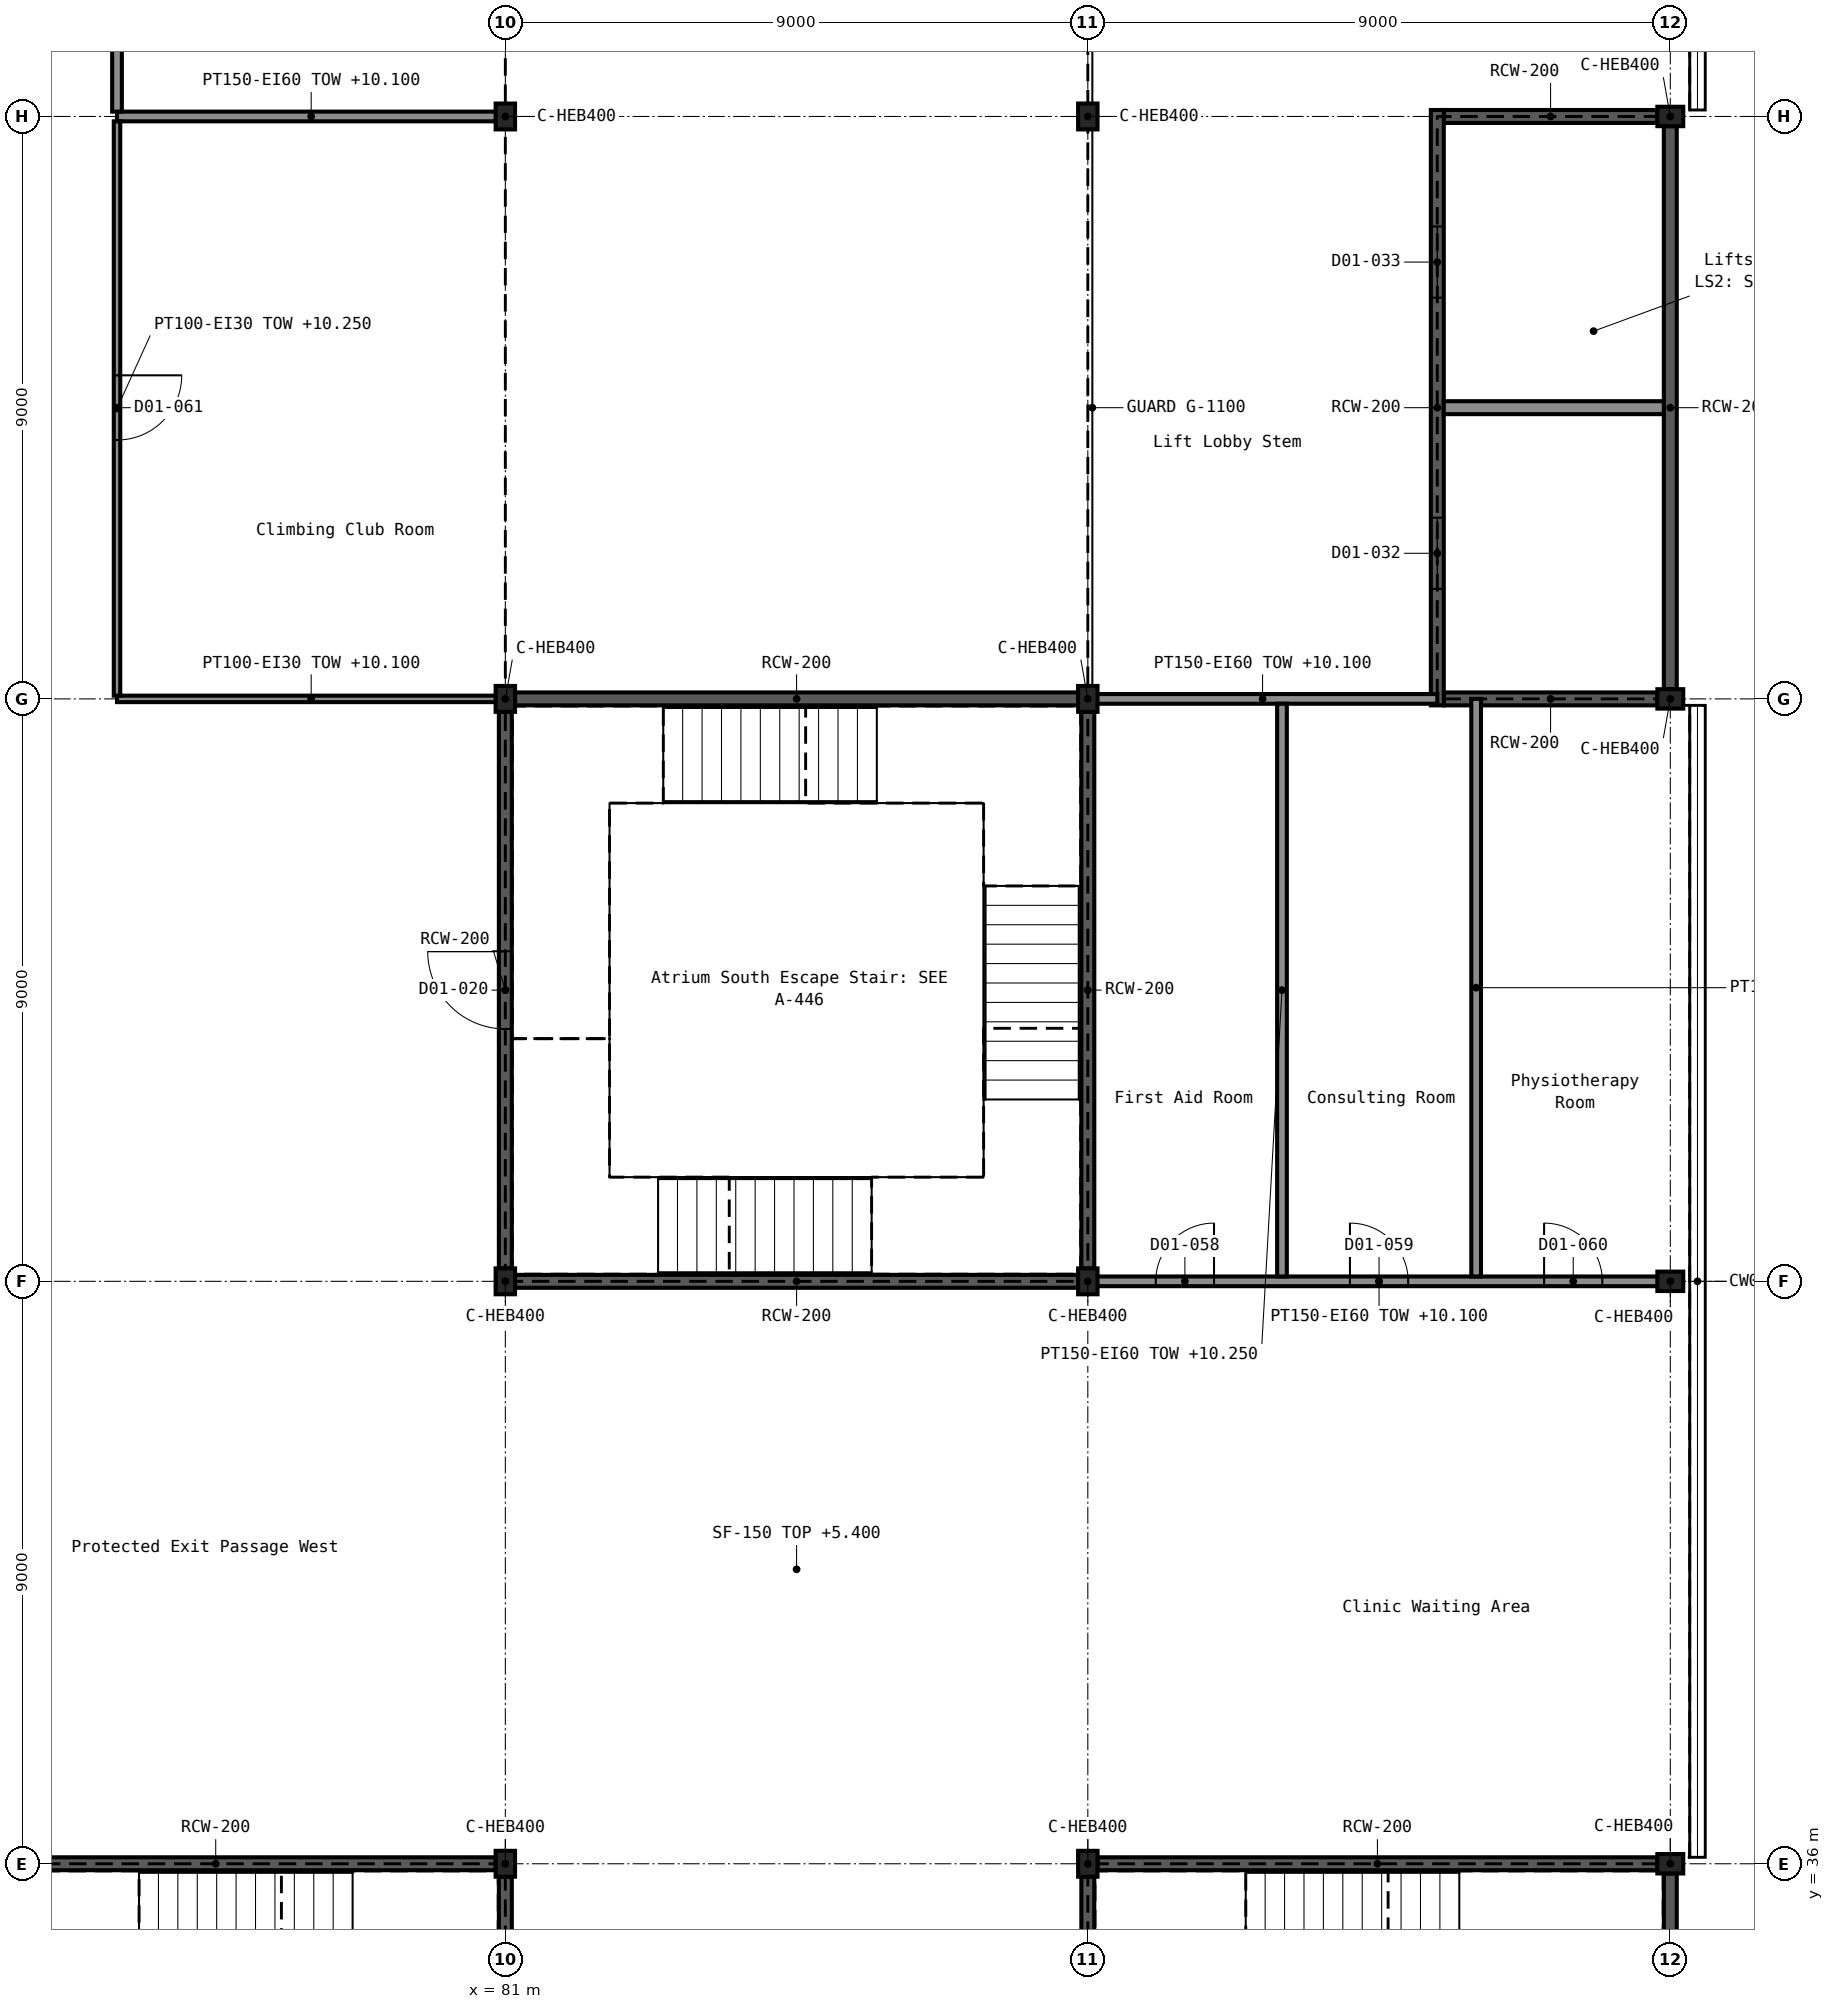
"""IFC4 building model, lengths in metres.
Left out: names, types, materials, properties, quantities, classifications, styles, units other than length and angle.
Written with IfcOpenShell. Run it as: python <this file> out.ifc"""

import sys

from ifc_helpers import new_model, si_unit, direction, frame, frame_2d, origin, origin_2d, place, context, subcontext, project, spatial, rectangle, i_section, extrude, element, fill, save


model = new_model("IFC4")
c1 = context("Model", 3, precision=1e-05, world=origin(), true_north=direction((0.0, 1.0)))
c2 = subcontext(c1, "Body", "Model", "MODEL_VIEW")
j1 = project(units=[si_unit("LENGTHUNIT", "METRE"), si_unit("PLANEANGLEUNIT", "RADIAN")], contexts=[c1])
p1 = place(None, origin())
s1 = spatial("IfcSite", under=j1, at=p1, CompositionType="ELEMENT")
p2 = place(p1, origin())
s2 = spatial("IfcBuilding", under=s1, at=p2, CompositionType="ELEMENT")
p3 = place(p2, frame((0.0, 0.0, 5.4)))
s3 = spatial("IfcBuildingStorey", under=s2, at=p3, CompositionType="ELEMENT", Elevation=5.4)
for number, where, z_axis, x_axis in (
    (1, (81.0, 36.0, 0.0), (0.0, 0.0, 1.0), (1.0, 0.0, 0.0)),
    (2, (90.0, 36.0, 0.0), (0.0, 0.0, 1.0), (1.0, 0.0, 0.0)),
    (3, (99.0, 36.0, 0.0), (0.0, 0.0, 1.0), (0.0, 1.0, 0.0)),
    (4, (81.0, 45.0, 0.0), (0.0, 0.0, 1.0), (1.0, 0.0, 0.0)),
    (5, (90.0, 45.0, 0.0), (0.0, 0.0, 1.0), (1.0, 0.0, 0.0)),
    (6, (99.0, 45.0, 0.0), (0.0, 0.0, 1.0), (0.0, 1.0, 0.0)),
    (7, (81.0, 54.0, 0.0), (0.0, 0.0, 1.0), (1.0, 0.0, 0.0)),
    (8, (90.0, 54.0, 0.0), (0.0, 0.0, 1.0), (1.0, 0.0, 0.0)),
    (9, (99.0, 54.0, 0.0), (0.0, 0.0, 1.0), (0.0, 1.0, 0.0)),
    (10, (81.0, 63.0, 0.0), (0.0, 0.0, 1.0), (1.0, 0.0, 0.0)),
    (11, (90.0, 63.0, 0.0), (0.0, 0.0, 1.0), (1.0, 0.0, 0.0)),
    (12, (99.0, 63.0, 0.0), (0.0, 0.0, 1.0), (0.0, 1.0, 0.0)),
):
    element("IfcColumn", number, at=place(p3, frame(where, z_axis=z_axis, x_axis=x_axis)), inside=s3, PredefinedType="COLUMN", context=c2, shape_type="SweptSolid", body=[
        extrude(i_section(OverallWidth=0.3, OverallDepth=0.4, WebThickness=0.013, FlangeThickness=0.024, FilletRadius=0.027, at=origin_2d()), origin(), (0.0, 0.0, 1.0), 5.4),
    ])
p4 = place(p3, frame((72.2, 36.0, 0.0), z_axis=(0.0, 0.0, 1.0), x_axis=(1.0, 0.0, 0.0)))
e13 = element("IfcWall", 13, at=p4, inside=s3, PredefinedType="SHEAR", context=c2, shape_type="SweptSolid", body=[
    extrude(rectangle(XDim=8.65, YDim=0.2, at=frame_2d((4.325, 0.0))), origin(), (0.0, 0.0, 1.0), 5.4),
])
p5 = place(p3, frame((81.0, 27.2, 0.0), z_axis=(0.0, 0.0, 1.0), x_axis=(0.0, 1.0, 0.0)))
e14 = element("IfcWall", 14, at=p5, inside=s3, PredefinedType="SHEAR", context=c2, shape_type="SweptSolid", body=[
    extrude(rectangle(XDim=8.6, YDim=0.2, at=frame_2d((4.3, 0.0))), origin(), (0.0, 0.0, 1.0), 5.4),
])
p6 = place(p5, frame((3.7, 0.0, 0.0)))
e15 = element("IfcOpeningElement", 15, at=p6, cuts=e14, PredefinedType="OPENING", context=c2, shape_type="SweptSolid", body=[
    extrude(rectangle(XDim=1.2, YDim=2.1, at=frame_2d((0.6, 1.05))), frame((0.0, 0.111, 0.0), z_axis=(0.0, -1.0, 0.0), x_axis=(1.0, 0.0, 0.0)), (0.0, 0.0, 1.0), 0.222),
])
p7 = place(p3, frame((90.15, 36.0, 0.0), z_axis=(0.0, 0.0, 1.0), x_axis=(1.0, 0.0, 0.0)))
e16 = element("IfcWall", 16, at=p7, inside=s3, PredefinedType="SHEAR", context=c2, shape_type="SweptSolid", body=[
    extrude(rectangle(XDim=8.65, YDim=0.2, at=frame_2d((4.325, 0.0))), origin(), (0.0, 0.0, 1.0), 5.4),
])
p8 = place(p3, frame((90.0, 27.2, 0.0), z_axis=(0.0, 0.0, 1.0), x_axis=(0.0, 1.0, 0.0)))
e17 = element("IfcWall", 17, at=p8, inside=s3, PredefinedType="SHEAR", context=c2, shape_type="SweptSolid", body=[
    extrude(rectangle(XDim=8.6, YDim=0.2, at=frame_2d((4.3, 0.0))), origin(), (0.0, 0.0, 1.0), 5.4),
])
p9 = place(p8, frame((3.7, 0.0, 0.0)))
e18 = element("IfcOpeningElement", 18, at=p9, cuts=e17, PredefinedType="OPENING", context=c2, shape_type="SweptSolid", body=[
    extrude(rectangle(XDim=1.2, YDim=2.1, at=frame_2d((0.6, 1.05))), frame((0.0, 0.111, 0.0), z_axis=(0.0, -1.0, 0.0), x_axis=(1.0, 0.0, 0.0)), (0.0, 0.0, 1.0), 0.222),
])
p10 = place(p3, frame((99.0, 27.15, -0.15), z_axis=(0.0, 0.0, 1.0), x_axis=(0.0, 1.0, 0.0)))
e19 = element("IfcWall", 19, at=p10, inside=s3, PredefinedType="SHEAR", context=c2, shape_type="SweptSolid", body=[
    extrude(rectangle(XDim=8.7, YDim=0.2, at=frame_2d((4.35, 0.0))), origin(), (0.0, 0.0, 1.0), 5.55),
])
for number, where, z_axis, x_axis in (
    (20, (81.15, 45.0, 0.0), (0.0, 0.0, 1.0), (1.0, 0.0, 0.0)),
    (21, (81.15, 54.0, 0.0), (0.0, 0.0, 1.0), (1.0, 0.0, 0.0)),
):
    element("IfcWall", number, at=place(p3, frame(where, z_axis=z_axis, x_axis=x_axis)), inside=s3, PredefinedType="SHEAR", context=c2, shape_type="SweptSolid", body=[
        extrude(rectangle(XDim=8.7, YDim=0.2, at=frame_2d((4.35, 0.0))), origin(), (0.0, 0.0, 1.0), 5.4),
    ])
p11 = place(p3, frame((81.0, 45.2, 0.0), z_axis=(0.0, 0.0, 1.0), x_axis=(0.0, 1.0, 0.0)))
e22 = element("IfcWall", 22, at=p11, inside=s3, PredefinedType="SHEAR", context=c2, shape_type="SweptSolid", body=[
    extrude(rectangle(XDim=8.6, YDim=0.2, at=frame_2d((4.3, 0.0))), origin(), (0.0, 0.0, 1.0), 5.4),
])
p12 = place(p11, frame((3.7, 0.0, 0.0)))
e23 = element("IfcOpeningElement", 23, at=p12, cuts=e22, PredefinedType="OPENING", context=c2, shape_type="SweptSolid", body=[
    extrude(rectangle(XDim=1.2, YDim=2.1, at=frame_2d((0.6, 1.05))), frame((0.0, 0.111, 0.0), z_axis=(0.0, -1.0, 0.0), x_axis=(1.0, 0.0, 0.0)), (0.0, 0.0, 1.0), 0.222),
])
p13 = place(p3, frame((90.0, 45.2, 0.0), z_axis=(0.0, 0.0, 1.0), x_axis=(0.0, 1.0, 0.0)))
e24 = element("IfcWall", 24, at=p13, inside=s3, PredefinedType="SHEAR", context=c2, shape_type="SweptSolid", body=[
    extrude(rectangle(XDim=8.6, YDim=0.2, at=frame_2d((4.3, 0.0))), origin(), (0.0, 0.0, 1.0), 5.4),
])
for number, where, z_axis, x_axis in (
    (25, (95.5, 54.0, 0.0), (0.0, 0.0, 1.0), (1.0, 0.0, 0.0)),
    (26, (95.5, 63.0, 0.0), (0.0, 0.0, 1.0), (1.0, 0.0, 0.0)),
):
    element("IfcWall", number, at=place(p3, frame(where, z_axis=z_axis, x_axis=x_axis)), inside=s3, PredefinedType="SHEAR", context=c2, shape_type="SweptSolid", body=[
        extrude(rectangle(XDim=3.3, YDim=0.2, at=frame_2d((1.65, 0.0))), origin(), (0.0, 0.0, 1.0), 5.4),
    ])
p14 = place(p3, frame((95.4, 53.9, 0.0), z_axis=(0.0, 0.0, 1.0), x_axis=(0.0, 1.0, 0.0)))
e27 = element("IfcWall", 27, at=p14, inside=s3, PredefinedType="SHEAR", context=c2, shape_type="SweptSolid", body=[
    extrude(rectangle(XDim=9.2, YDim=0.2, at=frame_2d((4.6, 0.0))), origin(), (0.0, 0.0, 1.0), 5.4),
])
p15 = place(p14, frame((1.8, 0.0, 0.0)))
e28 = element("IfcOpeningElement", 28, at=p15, cuts=e27, PredefinedType="OPENING", context=c2, shape_type="SweptSolid", body=[
    extrude(rectangle(XDim=1.1, YDim=2.1, at=frame_2d((0.55, 1.05))), frame((0.0, 0.111, 0.0), z_axis=(0.0, -1.0, 0.0), x_axis=(1.0, 0.0, 0.0)), (0.0, 0.0, 1.0), 0.222),
])
p16 = place(p14, frame((6.3, 0.0, 0.0)))
e29 = element("IfcOpeningElement", 29, at=p16, cuts=e27, PredefinedType="OPENING", context=c2, shape_type="SweptSolid", body=[
    extrude(rectangle(XDim=1.1, YDim=2.1, at=frame_2d((0.55, 1.05))), frame((0.0, 0.111, 0.0), z_axis=(0.0, -1.0, 0.0), x_axis=(1.0, 0.0, 0.0)), (0.0, 0.0, 1.0), 0.222),
])
p17 = place(p3, frame((99.0, 54.15, 0.0), z_axis=(0.0, 0.0, 1.0), x_axis=(0.0, 1.0, 0.0)))
e30 = element("IfcWall", 30, at=p17, inside=s3, PredefinedType="SHEAR", context=c2, shape_type="SweptSolid", body=[
    extrude(rectangle(XDim=8.7, YDim=0.2, at=frame_2d((4.35, 0.0))), origin(), (0.0, 0.0, 1.0), 5.4),
])
p18 = place(p3, frame((95.5, 58.5, 0.0), z_axis=(0.0, 0.0, 1.0), x_axis=(1.0, 0.0, 0.0)))
e31 = element("IfcWall", 31, at=p18, inside=s3, PredefinedType="SOLIDWALL", context=c2, shape_type="SweptSolid", body=[
    extrude(rectangle(XDim=3.4, YDim=0.2, at=frame_2d((1.7, 0.0))), origin(), (0.0, 0.0, 1.0), 5.4),
])
p19 = place(p3, frame((90.0, 45.0, 0.0), z_axis=(0.0, 0.0, 1.0), x_axis=(1.0, 0.0, 0.0)))
e32 = element("IfcWall", 32, at=p19, inside=s3, PredefinedType="PARTITIONING", context=c2, shape_type="SweptSolid", body=[
    extrude(rectangle(XDim=9.0, YDim=0.15, at=frame_2d((4.5, 0.0))), origin(), (0.0, 0.0, 1.0), 4.7),
])
p20 = place(p19, frame((1.05, 0.0, 0.0)))
e33 = element("IfcOpeningElement", 33, at=p20, cuts=e32, PredefinedType="OPENING", context=c2, shape_type="SweptSolid", body=[
    extrude(rectangle(XDim=0.9, YDim=2.1, at=frame_2d((0.45, 1.05))), frame((0.0, 0.086, 0.0), z_axis=(0.0, -1.0, 0.0), x_axis=(1.0, 0.0, 0.0)), (0.0, 0.0, 1.0), 0.172),
])
p21 = place(p19, frame((4.05, 0.0, 0.0)))
e34 = element("IfcOpeningElement", 34, at=p21, cuts=e32, PredefinedType="OPENING", context=c2, shape_type="SweptSolid", body=[
    extrude(rectangle(XDim=0.9, YDim=2.1, at=frame_2d((0.45, 1.05))), frame((0.0, 0.086, 0.0), z_axis=(0.0, -1.0, 0.0), x_axis=(1.0, 0.0, 0.0)), (0.0, 0.0, 1.0), 0.172),
])
p22 = place(p19, frame((7.05, 0.0, 0.0)))
e35 = element("IfcOpeningElement", 35, at=p22, cuts=e32, PredefinedType="OPENING", context=c2, shape_type="SweptSolid", body=[
    extrude(rectangle(XDim=0.9, YDim=2.1, at=frame_2d((0.45, 1.05))), frame((0.0, 0.086, 0.0), z_axis=(0.0, -1.0, 0.0), x_axis=(1.0, 0.0, 0.0)), (0.0, 0.0, 1.0), 0.172),
])
p23 = place(p3, frame((90.0, 54.0, 0.0), z_axis=(0.0, 0.0, 1.0), x_axis=(1.0, 0.0, 0.0)))
e36 = element("IfcWall", 36, at=p23, inside=s3, PredefinedType="PARTITIONING", context=c2, shape_type="SweptSolid", body=[
    extrude(rectangle(XDim=5.4, YDim=0.15, at=frame_2d((2.7, 0.0))), origin(), (0.0, 0.0, 1.0), 4.7),
])
p24 = place(p3, frame((75.0, 63.0, 0.0), z_axis=(0.0, 0.0, 1.0), x_axis=(1.0, 0.0, 0.0)))
e37 = element("IfcWall", 37, at=p24, inside=s3, PredefinedType="PARTITIONING", context=c2, shape_type="SweptSolid", body=[
    extrude(rectangle(XDim=6.0, YDim=0.15, at=frame_2d((3.0, 0.0))), origin(), (0.0, 0.0, 1.0), 4.7),
])
p25 = place(p3, frame((75.0, 63.075, 0.0), z_axis=(0.0, 0.0, 1.0), x_axis=(0.0, 1.0, 0.0)))
e38 = element("IfcWall", 38, at=p25, inside=s3, PredefinedType="PARTITIONING", context=c2, shape_type="SweptSolid", body=[
    extrude(rectangle(XDim=8.85, YDim=0.15, at=frame_2d((4.425, 0.0))), origin(), (0.0, 0.0, 1.0), 4.85),
])
p26 = place(p25, frame((3.975, 0.0, 0.0)))
e39 = element("IfcOpeningElement", 39, at=p26, cuts=e38, PredefinedType="OPENING", context=c2, shape_type="SweptSolid", body=[
    extrude(rectangle(XDim=0.9, YDim=2.4, at=frame_2d((0.45, 1.2))), frame((0.0, 0.086, 0.0), z_axis=(0.0, -1.0, 0.0), x_axis=(1.0, 0.0, 0.0)), (0.0, 0.0, 1.0), 0.172),
])
p27 = place(p3, frame((93.0, 45.075, 0.0), z_axis=(0.0, 0.0, 1.0), x_axis=(0.0, 1.0, 0.0)))
e40 = element("IfcWall", 40, at=p27, inside=s3, PredefinedType="PARTITIONING", context=c2, shape_type="SweptSolid", body=[
    extrude(rectangle(XDim=8.85, YDim=0.15, at=frame_2d((4.425, 0.0))), origin(), (0.0, 0.0, 1.0), 4.85),
])
p28 = place(p3, frame((96.0, 45.075, 0.0), z_axis=(0.0, 0.0, 1.0), x_axis=(0.0, 1.0, 0.0)))
e41 = element("IfcWall", 41, at=p28, inside=s3, PredefinedType="PARTITIONING", context=c2, shape_type="SweptSolid", body=[
    extrude(rectangle(XDim=8.925, YDim=0.15, at=frame_2d((4.462, 0.0))), origin(), (0.0, 0.0, 1.0), 4.85),
])
p29 = place(p3, frame((75.0, 54.0, 0.0), z_axis=(0.0, 0.0, 1.0), x_axis=(1.0, 0.0, 0.0)))
e42 = element("IfcWall", 42, at=p29, inside=s3, PredefinedType="PARTITIONING", context=c2, shape_type="SweptSolid", body=[
    extrude(rectangle(XDim=6.0, YDim=0.1, at=frame_2d((3.0, 0.0))), origin(), (0.0, 0.0, 1.0), 4.7),
])
p30 = place(p3, frame((75.0, 54.05, 0.0), z_axis=(0.0, 0.0, 1.0), x_axis=(0.0, 1.0, 0.0)))
e43 = element("IfcWall", 43, at=p30, inside=s3, PredefinedType="PARTITIONING", context=c2, shape_type="SweptSolid", body=[
    extrude(rectangle(XDim=8.875, YDim=0.1, at=frame_2d((4.438, 0.0))), origin(), (0.0, 0.0, 1.0), 4.85),
])
p31 = place(p30, frame((3.95, 0.0, 0.0)))
e44 = element("IfcOpeningElement", 44, at=p31, cuts=e43, PredefinedType="OPENING", context=c2, shape_type="SweptSolid", body=[
    extrude(rectangle(XDim=1.0, YDim=2.1, at=frame_2d((0.5, 1.05))), frame((0.0, 0.061, 0.0), z_axis=(0.0, -1.0, 0.0), x_axis=(1.0, 0.0, 0.0)), (0.0, 0.0, 1.0), 0.122),
])
p32 = place(p2, origin())
s4 = spatial("IfcBuildingStorey", under=s2, at=p32, CompositionType="ELEMENT", Elevation=0.0)
p33 = place(p32, frame((81.15, 54.1, 0.0), z_axis=(0.0, 0.0, 1.0), x_axis=(0.0, 1.0, 0.0)))
e45 = element("IfcWall", 45, at=p33, inside=s4, PredefinedType="SOLIDWALL", context=c2, shape_type="SweptSolid", body=[
    extrude(rectangle(XDim=17.8, YDim=0.3, at=frame_2d((8.9, 0.0))), origin(), (0.0, 0.0, 1.0), 16.0),
])
p34 = place(p12, origin())
e46 = element("IfcDoor", 46, at=p34, inside=s3, OperationType="SINGLE_SWING_RIGHT", PredefinedType="DOOR", context=c2, shape_type="SweptSolid", body=[
    extrude(rectangle(XDim=1.2, YDim=2.1, at=frame_2d((0.6, 1.05))), frame((0.0, 0.025, 0.0), z_axis=(0.0, -1.0, 0.0), x_axis=(1.0, 0.0, 0.0)), (0.0, 0.0, 1.0), 0.05),
])
fill(e23, e46)
p35 = place(p15, origin())
e47 = element("IfcDoor", 47, at=p35, inside=s3, OperationType="DOUBLE_DOOR_SLIDING", PredefinedType="DOOR", context=c2, shape_type="SweptSolid", body=[
    extrude(rectangle(XDim=1.1, YDim=2.1, at=frame_2d((0.55, 1.05))), frame((0.0, 0.025, 0.0), z_axis=(0.0, -1.0, 0.0), x_axis=(1.0, 0.0, 0.0)), (0.0, 0.0, 1.0), 0.05),
])
fill(e28, e47)
p36 = place(p16, origin())
e48 = element("IfcDoor", 48, at=p36, inside=s3, OperationType="DOUBLE_DOOR_SLIDING", PredefinedType="DOOR", context=c2, shape_type="SweptSolid", body=[
    extrude(rectangle(XDim=1.1, YDim=2.1, at=frame_2d((0.55, 1.05))), frame((0.0, 0.025, 0.0), z_axis=(0.0, -1.0, 0.0), x_axis=(1.0, 0.0, 0.0)), (0.0, 0.0, 1.0), 0.05),
])
fill(e29, e48)
p37 = place(p20, origin())
e49 = element("IfcDoor", 49, at=p37, inside=s3, OperationType="SINGLE_SWING_RIGHT", PredefinedType="DOOR", context=c2, shape_type="SweptSolid", body=[
    extrude(rectangle(XDim=0.9, YDim=2.1, at=frame_2d((0.45, 1.05))), frame((0.0, 0.025, 0.0), z_axis=(0.0, -1.0, 0.0), x_axis=(1.0, 0.0, 0.0)), (0.0, 0.0, 1.0), 0.05),
])
fill(e33, e49)
p38 = place(p21, origin())
e50 = element("IfcDoor", 50, at=p38, inside=s3, OperationType="SINGLE_SWING_LEFT", PredefinedType="DOOR", context=c2, shape_type="SweptSolid", body=[
    extrude(rectangle(XDim=0.9, YDim=2.1, at=frame_2d((0.45, 1.05))), frame((0.0, 0.025, 0.0), z_axis=(0.0, -1.0, 0.0), x_axis=(1.0, 0.0, 0.0)), (0.0, 0.0, 1.0), 0.05),
])
fill(e34, e50)
p39 = place(p22, origin())
e51 = element("IfcDoor", 51, at=p39, inside=s3, OperationType="SINGLE_SWING_LEFT", PredefinedType="DOOR", context=c2, shape_type="SweptSolid", body=[
    extrude(rectangle(XDim=0.9, YDim=2.1, at=frame_2d((0.45, 1.05))), frame((0.0, 0.025, 0.0), z_axis=(0.0, -1.0, 0.0), x_axis=(1.0, 0.0, 0.0)), (0.0, 0.0, 1.0), 0.05),
])
fill(e35, e51)
p40 = place(p31, frame((1.0, 0.0, 0.0), z_axis=(0.0, 0.0, 1.0), x_axis=(-1.0, 0.0, 0.0)))
e52 = element("IfcDoor", 52, at=p40, inside=s3, OperationType="SINGLE_SWING_LEFT", PredefinedType="DOOR", context=c2, shape_type="SweptSolid", body=[
    extrude(rectangle(XDim=1.0, YDim=2.1, at=frame_2d((0.5, 1.05))), frame((0.0, 0.025, 0.0), z_axis=(0.0, -1.0, 0.0), x_axis=(1.0, 0.0, 0.0)), (0.0, 0.0, 1.0), 0.05),
])
fill(e44, e52)
save(model, sys.argv[1])
